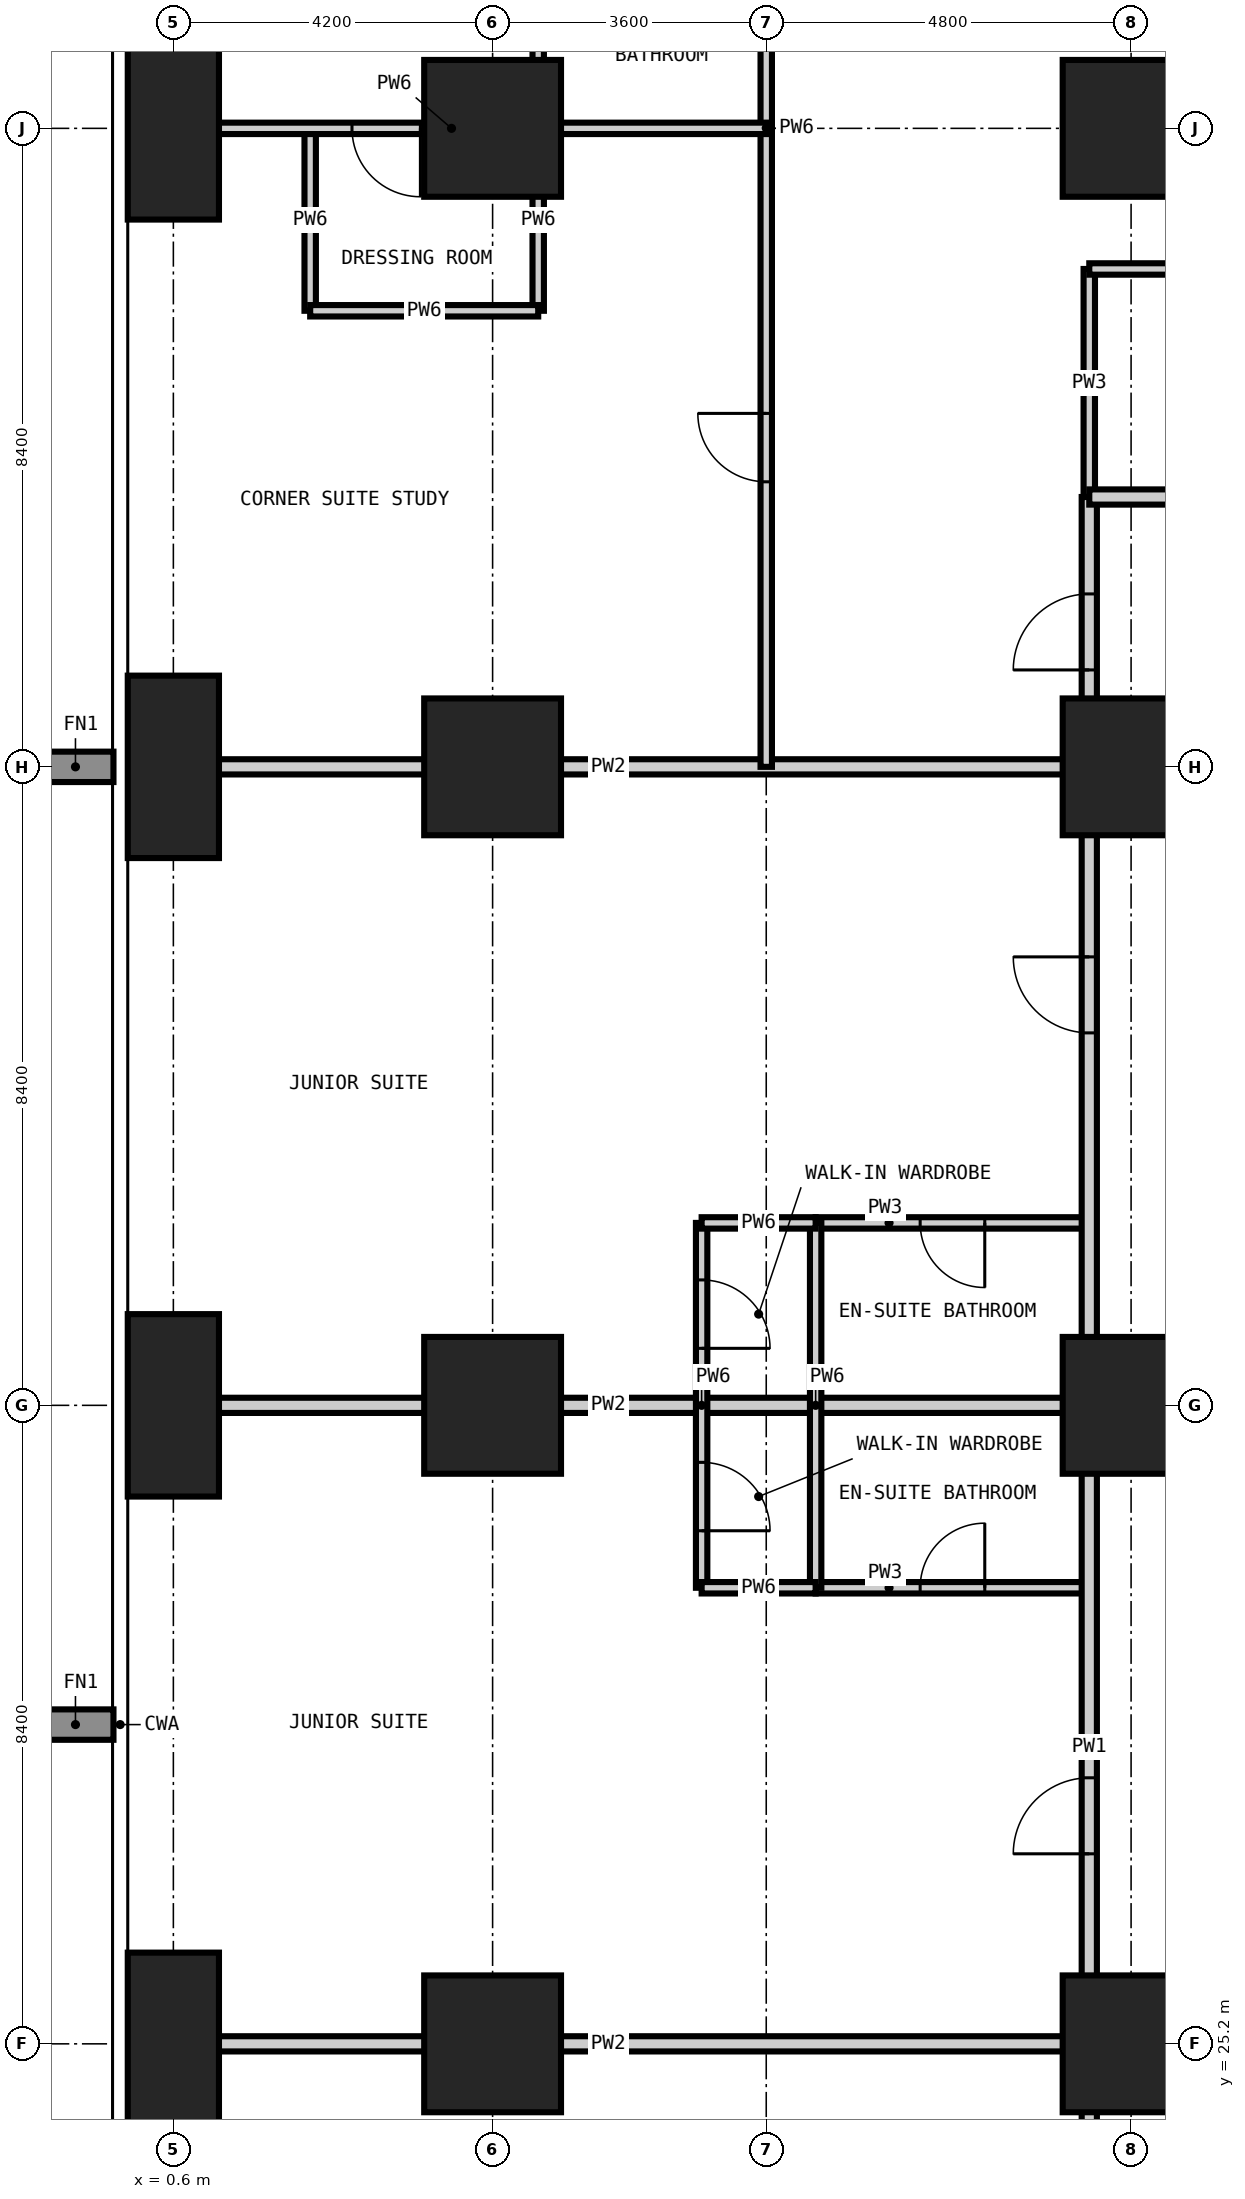
"""IFC4 building model, lengths in metres.
Left out: names, types, materials, properties, quantities, classifications, styles, units other than length and angle.
Written with IfcOpenShell. Run it as: python <this file> out.ifc"""

import sys

from ifc_helpers import new_model, si_unit, direction, frame, frame_2d, origin, origin_2d, place, context, subcontext, project, spatial, rectangle, extrude, element, fill, save


model = new_model("IFC4")
c1 = context("Model", 3, precision=1e-05, world=origin(), true_north=direction((0.0, 1.0)))
c2 = subcontext(c1, "Body", "Model", "MODEL_VIEW")
j1 = project(units=[si_unit("LENGTHUNIT", "METRE"), si_unit("PLANEANGLEUNIT", "RADIAN")], contexts=[c1])
p1 = place(None, origin())
s1 = spatial("IfcSite", under=j1, at=p1, CompositionType="ELEMENT")
p2 = place(p1, origin())
s2 = spatial("IfcBuilding", under=s1, at=p2, CompositionType="ELEMENT")
p3 = place(p2, frame((0.0, 0.0, 70.2)))
s3 = spatial("IfcBuildingStorey", under=s2, at=p3, CompositionType="ELEMENT", Elevation=70.2)
for number, where, z_axis, x_axis in (
    (1, (0.6, 25.2, -0.35), (0.0, 0.0, 1.0), (1.0, 0.0, 0.0)),
    (2, (0.6, 33.6, -0.35), (0.0, 0.0, 1.0), (1.0, 0.0, 0.0)),
    (3, (0.6, 42.0, -0.35), (0.0, 0.0, 1.0), (1.0, 0.0, 0.0)),
    (4, (0.6, 50.4, -0.35), (0.0, 0.0, 1.0), (1.0, 0.0, 0.0)),
):
    element("IfcColumn", number, at=place(p3, frame(where, z_axis=z_axis, x_axis=x_axis)), inside=s3, PredefinedType="COLUMN", context=c2, shape_type="SweptSolid", body=[
        extrude(rectangle(XDim=1.2, YDim=2.4, at=origin_2d()), origin(), (0.0, 0.0, 1.0), 3.6),
    ])
for number, where, z_axis, x_axis in (
    (5, (4.8, 25.2, -0.35), (0.0, 0.0, 1.0), (1.0, 0.0, 0.0)),
    (6, (4.8, 33.6, -0.35), (0.0, 0.0, 1.0), (1.0, 0.0, 0.0)),
    (7, (4.8, 42.0, -0.35), (0.0, 0.0, 1.0), (1.0, 0.0, 0.0)),
    (8, (4.8, 50.4, -0.35), (0.0, 0.0, 1.0), (1.0, 0.0, 0.0)),
    (9, (13.2, 25.2, -0.35), (0.0, 0.0, 1.0), (1.0, 0.0, 0.0)),
    (10, (13.2, 33.6, -0.35), (0.0, 0.0, 1.0), (1.0, 0.0, 0.0)),
    (11, (13.2, 42.0, -0.35), (0.0, 0.0, 1.0), (1.0, 0.0, 0.0)),
    (12, (13.2, 50.4, -0.35), (0.0, 0.0, 1.0), (1.0, 0.0, 0.0)),
):
    element("IfcColumn", number, at=place(p3, frame(where, z_axis=z_axis, x_axis=x_axis)), inside=s3, PredefinedType="COLUMN", context=c2, shape_type="SweptSolid", body=[
        extrude(rectangle(XDim=1.8, YDim=1.8, at=origin_2d()), origin(), (0.0, 0.0, 1.0), 3.6),
    ])
p4 = place(p3, frame((5.4, 50.4, 0.0), z_axis=(0.0, 0.0, 1.0), x_axis=(0.0, 1.0, 0.0)))
e13 = element("IfcWall", 13, at=p4, inside=s3, PredefinedType="PARTITIONING", context=c2, shape_type="SweptSolid", body=[
    extrude(rectangle(XDim=3.6, YDim=0.15, at=frame_2d((1.8, 0.0))), origin(), (0.0, 0.0, 1.0), 3.25),
])
p5 = place(p4, frame((1.375, 0.0, 0.0)))
e14 = element("IfcOpeningElement", 14, at=p5, cuts=e13, PredefinedType="OPENING", context=c2, shape_type="SweptSolid", body=[
    extrude(rectangle(XDim=0.85, YDim=2.1, at=frame_2d((0.425, 1.05))), frame((0.0, 0.085, 0.0), z_axis=(0.0, -1.0, 0.0), x_axis=(1.0, 0.0, 0.0)), (0.0, 0.0, 1.0), 0.17),
])
p6 = place(p3, frame((12.65, 45.55, 0.0), z_axis=(0.0, 0.0, 1.0), x_axis=(0.0, 1.0, 0.0)))
e15 = element("IfcWall", 15, at=p6, inside=s3, PredefinedType="PARTITIONING", context=c2, shape_type="SweptSolid", body=[
    extrude(rectangle(XDim=3.0, YDim=0.15, at=frame_2d((1.5, 0.0))), origin(), (0.0, 0.0, 1.0), 3.25),
])
p7 = place(p3, frame((9.05, 31.2, 0.0), z_axis=(0.0, 0.0, 1.0), x_axis=(1.0, 0.0, 0.0)))
e16 = element("IfcWall", 16, at=p7, inside=s3, PredefinedType="PARTITIONING", context=c2, shape_type="SweptSolid", body=[
    extrude(rectangle(XDim=3.6, YDim=0.15, at=frame_2d((1.8, 0.0))), origin(), (0.0, 0.0, 1.0), 3.25),
])
p8 = place(p7, frame((1.375, 0.0, 0.0)))
e17 = element("IfcOpeningElement", 17, at=p8, cuts=e16, PredefinedType="OPENING", context=c2, shape_type="SweptSolid", body=[
    extrude(rectangle(XDim=0.85, YDim=2.1, at=frame_2d((0.425, 1.05))), frame((0.0, 0.085, 0.0), z_axis=(0.0, -1.0, 0.0), x_axis=(1.0, 0.0, 0.0)), (0.0, 0.0, 1.0), 0.17),
])
p9 = place(p3, frame((9.05, 36.0, 0.0), z_axis=(0.0, 0.0, 1.0), x_axis=(1.0, 0.0, 0.0)))
e18 = element("IfcWall", 18, at=p9, inside=s3, PredefinedType="PARTITIONING", context=c2, shape_type="SweptSolid", body=[
    extrude(rectangle(XDim=3.6, YDim=0.15, at=frame_2d((1.8, 0.0))), origin(), (0.0, 0.0, 1.0), 3.25),
])
p10 = place(p9, frame((1.375, 0.0, 0.0)))
e19 = element("IfcOpeningElement", 19, at=p10, cuts=e18, PredefinedType="OPENING", context=c2, shape_type="SweptSolid", body=[
    extrude(rectangle(XDim=0.85, YDim=2.1, at=frame_2d((0.425, 1.05))), frame((0.0, 0.085, 0.0), z_axis=(0.0, -1.0, 0.0), x_axis=(1.0, 0.0, 0.0)), (0.0, 0.0, 1.0), 0.17),
])
p11 = place(p3, frame((12.65, 48.55, 0.0), z_axis=(0.0, 0.0, 1.0), x_axis=(1.0, 0.0, 0.0)))
e20 = element("IfcWall", 20, at=p11, inside=s3, PredefinedType="PARTITIONING", context=c2, shape_type="SweptSolid", body=[
    extrude(rectangle(XDim=4.15, YDim=0.15, at=frame_2d((2.075, 0.0))), origin(), (0.0, 0.0, 1.0), 3.25),
])
p12 = place(p11, frame((1.65, 0.0, 0.0)))
e21 = element("IfcOpeningElement", 21, at=p12, cuts=e20, PredefinedType="OPENING", context=c2, shape_type="SweptSolid", body=[
    extrude(rectangle(XDim=0.85, YDim=2.1, at=frame_2d((0.425, 1.05))), frame((0.0, 0.085, 0.0), z_axis=(0.0, -1.0, 0.0), x_axis=(1.0, 0.0, 0.0)), (0.0, 0.0, 1.0), 0.17),
])
p13 = place(p3, frame((12.65, 12.65, 0.0), z_axis=(0.0, 0.0, 1.0), x_axis=(0.0, 1.0, 0.0)))
e22 = element("IfcWall", 22, at=p13, inside=s3, PredefinedType="PARTITIONING", context=c2, shape_type="SweptSolid", body=[
    extrude(rectangle(XDim=32.9, YDim=0.2, at=frame_2d((16.45, 0.0))), origin(), (0.0, 0.0, 1.0), 3.25),
])
p14 = place(p13, frame((9.05, 0.0, 0.0)))
e23 = element("IfcOpeningElement", 23, at=p14, cuts=e22, PredefinedType="OPENING", context=c2, shape_type="SweptSolid", body=[
    extrude(rectangle(XDim=1.0, YDim=2.2, at=frame_2d((0.5, 1.1))), frame((0.0, 0.11, 0.0), z_axis=(0.0, -1.0, 0.0), x_axis=(1.0, 0.0, 0.0)), (0.0, 0.0, 1.0), 0.22),
])
p15 = place(p13, frame((15.05, 0.0, 0.0)))
e24 = element("IfcOpeningElement", 24, at=p15, cuts=e22, PredefinedType="OPENING", context=c2, shape_type="SweptSolid", body=[
    extrude(rectangle(XDim=1.0, YDim=2.2, at=frame_2d((0.5, 1.1))), frame((0.0, 0.11, 0.0), z_axis=(0.0, -1.0, 0.0), x_axis=(1.0, 0.0, 0.0)), (0.0, 0.0, 1.0), 0.22),
])
p16 = place(p13, frame((25.85, 0.0, 0.0)))
e25 = element("IfcOpeningElement", 25, at=p16, cuts=e22, PredefinedType="OPENING", context=c2, shape_type="SweptSolid", body=[
    extrude(rectangle(XDim=1.0, YDim=2.2, at=frame_2d((0.5, 1.1))), frame((0.0, 0.11, 0.0), z_axis=(0.0, -1.0, 0.0), x_axis=(1.0, 0.0, 0.0)), (0.0, 0.0, 1.0), 0.22),
])
p17 = place(p13, frame((1.575, 0.0, 0.0)))
e26 = element("IfcOpeningElement", 26, at=p17, cuts=e22, PredefinedType="OPENING", context=c2, shape_type="SweptSolid", body=[
    extrude(rectangle(XDim=1.0, YDim=2.2, at=frame_2d((0.5, 1.1))), frame((0.0, 0.11, 0.0), z_axis=(0.0, -1.0, 0.0), x_axis=(1.0, 0.0, 0.0)), (0.0, 0.0, 1.0), 0.22),
])
p18 = place(p13, frame((30.625, 0.0, 0.0)))
e27 = element("IfcOpeningElement", 27, at=p18, cuts=e22, PredefinedType="OPENING", context=c2, shape_type="SweptSolid", body=[
    extrude(rectangle(XDim=1.0, YDim=2.2, at=frame_2d((0.5, 1.1))), frame((0.0, 0.11, 0.0), z_axis=(0.0, -1.0, 0.0), x_axis=(1.0, 0.0, 0.0)), (0.0, 0.0, 1.0), 0.22),
])
p19 = place(p3, frame((12.65, 45.55, 0.0), z_axis=(0.0, 0.0, 1.0), x_axis=(1.0, 0.0, 0.0)))
e28 = element("IfcWall", 28, at=p19, inside=s3, PredefinedType="PARTITIONING", context=c2, shape_type="SweptSolid", body=[
    extrude(rectangle(XDim=32.3, YDim=0.2, at=frame_2d((16.15, 0.0))), origin(), (0.0, 0.0, 1.0), 3.25),
])
p20 = place(p19, frame((6.95, 0.0, 0.0)))
e29 = element("IfcOpeningElement", 29, at=p20, cuts=e28, PredefinedType="OPENING", context=c2, shape_type="SweptSolid", body=[
    extrude(rectangle(XDim=1.0, YDim=2.2, at=frame_2d((0.5, 1.1))), frame((0.0, 0.11, 0.0), z_axis=(0.0, -1.0, 0.0), x_axis=(1.0, 0.0, 0.0)), (0.0, 0.0, 1.0), 0.22),
])
p21 = place(p19, frame((10.85, 0.0, 0.0)))
e30 = element("IfcOpeningElement", 30, at=p21, cuts=e28, PredefinedType="OPENING", context=c2, shape_type="SweptSolid", body=[
    extrude(rectangle(XDim=1.0, YDim=2.2, at=frame_2d((0.5, 1.1))), frame((0.0, 0.11, 0.0), z_axis=(0.0, -1.0, 0.0), x_axis=(1.0, 0.0, 0.0)), (0.0, 0.0, 1.0), 0.22),
])
p22 = place(p19, frame((21.65, 0.0, 0.0)))
e31 = element("IfcOpeningElement", 31, at=p22, cuts=e28, PredefinedType="OPENING", context=c2, shape_type="SweptSolid", body=[
    extrude(rectangle(XDim=1.0, YDim=2.2, at=frame_2d((0.5, 1.1))), frame((0.0, 0.11, 0.0), z_axis=(0.0, -1.0, 0.0), x_axis=(1.0, 0.0, 0.0)), (0.0, 0.0, 1.0), 0.22),
])
p23 = place(p19, frame((25.55, 0.0, 0.0)))
e32 = element("IfcOpeningElement", 32, at=p23, cuts=e28, PredefinedType="OPENING", context=c2, shape_type="SweptSolid", body=[
    extrude(rectangle(XDim=1.0, YDim=2.2, at=frame_2d((0.5, 1.1))), frame((0.0, 0.11, 0.0), z_axis=(0.0, -1.0, 0.0), x_axis=(1.0, 0.0, 0.0)), (0.0, 0.0, 1.0), 0.22),
])
for number, where, z_axis, x_axis in (
    (33, (-0.008, 25.2, 0.0), (0.0, 0.0, 1.0), (1.0, 0.0, 0.0)),
    (34, (-0.008, 33.6, 0.0), (0.0, 0.0, 1.0), (1.0, 0.0, 0.0)),
    (35, (-0.008, 42.0, 0.0), (0.0, 0.0, 1.0), (1.0, 0.0, 0.0)),
):
    element("IfcWall", number, at=place(p3, frame(where, z_axis=z_axis, x_axis=x_axis)), inside=s3, PredefinedType="PARTITIONING", context=c2, shape_type="SweptSolid", body=[
        extrude(rectangle(XDim=12.658, YDim=0.2, at=frame_2d((6.329, 0.0))), origin(), (0.0, 0.0, 1.0), 3.25),
    ])
for number, where, z_axis, x_axis in (
    (36, (2.4, 48.0, 0.0), (0.0, 0.0, 1.0), (0.0, 1.0, 0.0)),
    (37, (5.4, 48.0, 0.0), (0.0, 0.0, 1.0), (0.0, 1.0, 0.0)),
):
    element("IfcWall", number, at=place(p3, frame(where, z_axis=z_axis, x_axis=x_axis)), inside=s3, PredefinedType="PARTITIONING", context=c2, shape_type="SweptSolid", body=[
        extrude(rectangle(XDim=2.4, YDim=0.15, at=frame_2d((1.2, 0.0))), origin(), (0.0, 0.0, 1.0), 3.25),
    ])
p24 = place(p3, frame((7.55, 31.2, 0.0), z_axis=(0.0, 0.0, 1.0), x_axis=(0.0, 1.0, 0.0)))
e38 = element("IfcWall", 38, at=p24, inside=s3, PredefinedType="PARTITIONING", context=c2, shape_type="SweptSolid", body=[
    extrude(rectangle(XDim=4.8, YDim=0.15, at=frame_2d((2.4, 0.0))), origin(), (0.0, 0.0, 1.0), 3.25),
])
p25 = place(p24, frame((0.75, 0.0, 0.0)))
e39 = element("IfcOpeningElement", 39, at=p25, cuts=e38, PredefinedType="OPENING", context=c2, shape_type="SweptSolid", body=[
    extrude(rectangle(XDim=0.9, YDim=2.1, at=frame_2d((0.45, 1.05))), frame((0.0, 0.085, 0.0), z_axis=(0.0, -1.0, 0.0), x_axis=(1.0, 0.0, 0.0)), (0.0, 0.0, 1.0), 0.17),
])
p26 = place(p24, frame((3.15, 0.0, 0.0)))
e40 = element("IfcOpeningElement", 40, at=p26, cuts=e38, PredefinedType="OPENING", context=c2, shape_type="SweptSolid", body=[
    extrude(rectangle(XDim=0.9, YDim=2.1, at=frame_2d((0.45, 1.05))), frame((0.0, 0.085, 0.0), z_axis=(0.0, -1.0, 0.0), x_axis=(1.0, 0.0, 0.0)), (0.0, 0.0, 1.0), 0.17),
])
p27 = place(p3, frame((8.4, 42.0, 0.0), z_axis=(0.0, 0.0, 1.0), x_axis=(0.0, 1.0, 0.0)))
e41 = element("IfcWall", 41, at=p27, inside=s3, PredefinedType="PARTITIONING", context=c2, shape_type="SweptSolid", body=[
    extrude(rectangle(XDim=16.808, YDim=0.15, at=frame_2d((8.404, 0.0))), origin(), (0.0, 0.0, 1.0), 3.25),
])
p28 = place(p27, frame((13.95, 0.0, 0.0)))
e42 = element("IfcOpeningElement", 42, at=p28, cuts=e41, PredefinedType="OPENING", context=c2, shape_type="SweptSolid", body=[
    extrude(rectangle(XDim=0.9, YDim=2.1, at=frame_2d((0.45, 1.05))), frame((0.0, 0.085, 0.0), z_axis=(0.0, -1.0, 0.0), x_axis=(1.0, 0.0, 0.0)), (0.0, 0.0, 1.0), 0.17),
])
p29 = place(p27, frame((3.75, 0.0, 0.0)))
e43 = element("IfcOpeningElement", 43, at=p29, cuts=e41, PredefinedType="OPENING", context=c2, shape_type="SweptSolid", body=[
    extrude(rectangle(XDim=0.9, YDim=2.1, at=frame_2d((0.45, 1.05))), frame((0.0, 0.085, 0.0), z_axis=(0.0, -1.0, 0.0), x_axis=(1.0, 0.0, 0.0)), (0.0, 0.0, 1.0), 0.17),
])
p30 = place(p3, frame((9.05, 31.2, 0.0), z_axis=(0.0, 0.0, 1.0), x_axis=(0.0, 1.0, 0.0)))
e44 = element("IfcWall", 44, at=p30, inside=s3, PredefinedType="PARTITIONING", context=c2, shape_type="SweptSolid", body=[
    extrude(rectangle(XDim=4.8, YDim=0.15, at=frame_2d((2.4, 0.0))), origin(), (0.0, 0.0, 1.0), 3.25),
])
for number, where, z_axis, x_axis in (
    (45, (7.55, 31.2, 0.0), (0.0, 0.0, 1.0), (1.0, 0.0, 0.0)),
    (46, (7.55, 36.0, 0.0), (0.0, 0.0, 1.0), (1.0, 0.0, 0.0)),
):
    element("IfcWall", number, at=place(p3, frame(where, z_axis=z_axis, x_axis=x_axis)), inside=s3, PredefinedType="PARTITIONING", context=c2, shape_type="SweptSolid", body=[
        extrude(rectangle(XDim=1.5, YDim=0.15, at=frame_2d((0.75, 0.0))), origin(), (0.0, 0.0, 1.0), 3.25),
    ])
p31 = place(p3, frame((2.4, 48.0, 0.0), z_axis=(0.0, 0.0, 1.0), x_axis=(1.0, 0.0, 0.0)))
e47 = element("IfcWall", 47, at=p31, inside=s3, PredefinedType="PARTITIONING", context=c2, shape_type="SweptSolid", body=[
    extrude(rectangle(XDim=3.0, YDim=0.15, at=frame_2d((1.5, 0.0))), origin(), (0.0, 0.0, 1.0), 3.25),
])
p32 = place(p3, frame((-0.008, 50.4, 0.0), z_axis=(0.0, 0.0, 1.0), x_axis=(1.0, 0.0, 0.0)))
e48 = element("IfcWall", 48, at=p32, inside=s3, PredefinedType="PARTITIONING", context=c2, shape_type="SweptSolid", body=[
    extrude(rectangle(XDim=8.408, YDim=0.15, at=frame_2d((4.204, 0.0))), origin(), (0.0, 0.0, 1.0), 3.25),
])
p33 = place(p32, frame((2.958, 0.0, 0.0)))
e49 = element("IfcOpeningElement", 49, at=p33, cuts=e48, PredefinedType="OPENING", context=c2, shape_type="SweptSolid", body=[
    extrude(rectangle(XDim=0.9, YDim=2.1, at=frame_2d((0.45, 1.05))), frame((0.0, 0.085, 0.0), z_axis=(0.0, -1.0, 0.0), x_axis=(1.0, 0.0, 0.0)), (0.0, 0.0, 1.0), 0.17),
])
p34 = place(p15, origin())
e50 = element("IfcDoor", 50, at=p34, inside=s3, OperationType="SINGLE_SWING_LEFT", PredefinedType="DOOR", context=c2, shape_type="SweptSolid", body=[
    extrude(rectangle(XDim=1.0, YDim=2.2, at=frame_2d((0.5, 1.1))), frame((0.0, 0.025, 0.0), z_axis=(0.0, -1.0, 0.0), x_axis=(1.0, 0.0, 0.0)), (0.0, 0.0, 1.0), 0.05),
])
fill(e24, e50)
p35 = place(p8, origin())
e51 = element("IfcDoor", 51, at=p35, inside=s3, OperationType="SINGLE_SWING_RIGHT", PredefinedType="DOOR", context=c2, shape_type="SweptSolid", body=[
    extrude(rectangle(XDim=0.85, YDim=2.1, at=frame_2d((0.425, 1.05))), frame((0.0, 0.025, 0.0), z_axis=(0.0, -1.0, 0.0), x_axis=(1.0, 0.0, 0.0)), (0.0, 0.0, 1.0), 0.05),
])
fill(e17, e51)
p36 = place(p25, frame((0.9, 0.0, 0.0), z_axis=(0.0, 0.0, 1.0), x_axis=(-1.0, 0.0, 0.0)))
e52 = element("IfcDoor", 52, at=p36, inside=s3, OperationType="SINGLE_SWING_RIGHT", PredefinedType="DOOR", context=c2, shape_type="SweptSolid", body=[
    extrude(rectangle(XDim=0.9, YDim=2.1, at=frame_2d((0.45, 1.05))), frame((0.0, 0.025, 0.0), z_axis=(0.0, -1.0, 0.0), x_axis=(1.0, 0.0, 0.0)), (0.0, 0.0, 1.0), 0.05),
])
fill(e39, e52)
p37 = place(p16, origin())
e53 = element("IfcDoor", 53, at=p37, inside=s3, OperationType="SINGLE_SWING_RIGHT", PredefinedType="DOOR", context=c2, shape_type="SweptSolid", body=[
    extrude(rectangle(XDim=1.0, YDim=2.2, at=frame_2d((0.5, 1.1))), frame((0.0, 0.025, 0.0), z_axis=(0.0, -1.0, 0.0), x_axis=(1.0, 0.0, 0.0)), (0.0, 0.0, 1.0), 0.05),
])
fill(e25, e53)
p38 = place(p10, frame((0.85, 0.0, 0.0), z_axis=(0.0, 0.0, 1.0), x_axis=(-1.0, 0.0, 0.0)))
e54 = element("IfcDoor", 54, at=p38, inside=s3, OperationType="SINGLE_SWING_LEFT", PredefinedType="DOOR", context=c2, shape_type="SweptSolid", body=[
    extrude(rectangle(XDim=0.85, YDim=2.1, at=frame_2d((0.425, 1.05))), frame((0.0, 0.025, 0.0), z_axis=(0.0, -1.0, 0.0), x_axis=(1.0, 0.0, 0.0)), (0.0, 0.0, 1.0), 0.05),
])
fill(e19, e54)
p39 = place(p26, frame((0.9, 0.0, 0.0), z_axis=(0.0, 0.0, 1.0), x_axis=(-1.0, 0.0, 0.0)))
e55 = element("IfcDoor", 55, at=p39, inside=s3, OperationType="SINGLE_SWING_RIGHT", PredefinedType="DOOR", context=c2, shape_type="SweptSolid", body=[
    extrude(rectangle(XDim=0.9, YDim=2.1, at=frame_2d((0.45, 1.05))), frame((0.0, 0.025, 0.0), z_axis=(0.0, -1.0, 0.0), x_axis=(1.0, 0.0, 0.0)), (0.0, 0.0, 1.0), 0.05),
])
fill(e40, e55)
p40 = place(p18, origin())
e56 = element("IfcDoor", 56, at=p40, inside=s3, OperationType="SINGLE_SWING_LEFT", PredefinedType="DOOR", context=c2, shape_type="SweptSolid", body=[
    extrude(rectangle(XDim=1.0, YDim=2.2, at=frame_2d((0.5, 1.1))), frame((0.0, 0.025, 0.0), z_axis=(0.0, -1.0, 0.0), x_axis=(1.0, 0.0, 0.0)), (0.0, 0.0, 1.0), 0.05),
])
fill(e27, e56)
p41 = place(p33, frame((0.9, 0.0, 0.0), z_axis=(0.0, 0.0, 1.0), x_axis=(-1.0, 0.0, 0.0)))
e57 = element("IfcDoor", 57, at=p41, inside=s3, OperationType="SINGLE_SWING_LEFT", PredefinedType="DOOR", context=c2, shape_type="SweptSolid", body=[
    extrude(rectangle(XDim=0.9, YDim=2.1, at=frame_2d((0.45, 1.05))), frame((0.0, 0.025, 0.0), z_axis=(0.0, -1.0, 0.0), x_axis=(1.0, 0.0, 0.0)), (0.0, 0.0, 1.0), 0.05),
])
fill(e49, e57)
p42 = place(p29, origin())
e58 = element("IfcDoor", 58, at=p42, inside=s3, OperationType="SINGLE_SWING_RIGHT", PredefinedType="DOOR", context=c2, shape_type="SweptSolid", body=[
    extrude(rectangle(XDim=0.9, YDim=2.1, at=frame_2d((0.45, 1.05))), frame((0.0, 0.025, 0.0), z_axis=(0.0, -1.0, 0.0), x_axis=(1.0, 0.0, 0.0)), (0.0, 0.0, 1.0), 0.05),
])
fill(e43, e58)
save(model, sys.argv[1])
